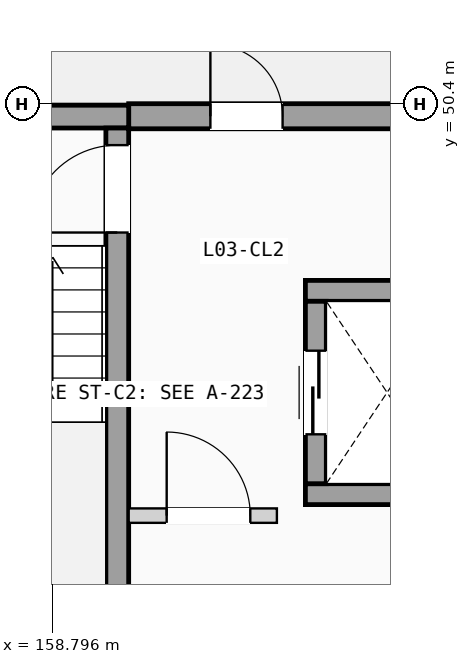
"""IFC4 building model, lengths in metres.
Left out: names, types, materials, properties, quantities, classifications, styles, units other than length and angle.
Written with IfcOpenShell. Run it as: python <this file> out.ifc"""

import sys

from ifc_helpers import new_model, si_unit, direction, frame, frame_2d, origin, place, context, subcontext, project, spatial, rectangle, extrude, element, fill, save


model = new_model("IFC4")
c1 = context("Model", 3, precision=1e-05, world=origin(), true_north=direction((0.0, 1.0)))
c2 = subcontext(c1, "Body", "Model", "MODEL_VIEW")
j1 = project(units=[si_unit("LENGTHUNIT", "METRE"), si_unit("PLANEANGLEUNIT", "RADIAN")], contexts=[c1])
p1 = place(None, origin())
s1 = spatial("IfcSite", under=j1, at=p1, CompositionType="ELEMENT")
p2 = place(p1, origin())
s2 = spatial("IfcBuilding", under=s1, at=p2, CompositionType="ELEMENT")
p3 = place(p2, frame((0.0, 0.0, 12.075)))
s3 = spatial("IfcBuildingStorey", under=s2, at=p3, CompositionType="ELEMENT", Elevation=12.075)
p4 = place(p3, frame((159.8, 50.235, 0.0), z_axis=(0.0, 0.0, 1.0), x_axis=(1.0, 0.0, 0.0)))
e1 = element("IfcWall", 1, at=p4, inside=s3, PredefinedType="SOLIDWALL", context=c2, shape_type="SweptSolid", body=[
    extrude(rectangle(XDim=4.1, YDim=0.33, at=frame_2d((2.05, 0.0))), origin(), (0.0, 0.0, 1.0), 2.89),
])
p5 = place(p4, frame((1.075, 0.0, 0.0)))
e2 = element("IfcOpeningElement", 2, at=p5, cuts=e1, PredefinedType="OPENING", context=c2, shape_type="SweptSolid", body=[
    extrude(rectangle(XDim=0.95, YDim=2.15, at=frame_2d((0.475, 1.075))), frame((0.0, 0.175, 0.0), z_axis=(0.0, -1.0, 0.0), x_axis=(1.0, 0.0, 0.0)), (0.0, 0.0, 1.0), 0.35),
])
p6 = place(p3, frame((156.2, 50.23, 0.0), z_axis=(0.0, 0.0, 1.0), x_axis=(1.0, 0.0, 0.0)))
e3 = element("IfcWall", 3, at=p6, inside=s3, PredefinedType="SHEAR", context=c2, shape_type="SweptSolid", body=[
    extrude(rectangle(XDim=3.6, YDim=0.3, at=frame_2d((1.8, 0.0))), origin(), (0.0, 0.0, 1.0), 2.89),
])
p7 = place(p3, frame((159.65, 43.08, 0.0), z_axis=(0.0, 0.0, 1.0), x_axis=(0.0, 1.0, 0.0)))
e4 = element("IfcWall", 4, at=p7, inside=s3, PredefinedType="SHEAR", context=c2, shape_type="SweptSolid", body=[
    extrude(rectangle(XDim=7.0, YDim=0.3, at=frame_2d((3.5, 0.0))), origin(), (0.0, 0.0, 1.0), 2.89),
])
p8 = place(p7, frame((5.625, 0.0, 0.0)))
e5 = element("IfcOpeningElement", 5, at=p8, cuts=e4, PredefinedType="OPENING", context=c2, shape_type="SweptSolid", body=[
    extrude(rectangle(XDim=1.15, YDim=2.12, at=frame_2d((0.575, 1.06))), frame((0.0, 0.16, 0.0), z_axis=(0.0, -1.0, 0.0), x_axis=(1.0, 0.0, 0.0)), (0.0, 0.0, 1.0), 0.32),
])
for number, where, z_axis, x_axis in (
    (6, (162.125, 45.262, 0.0), (0.0, 0.0, 1.0), (1.0, 0.0, 0.0)),
    (7, (162.125, 47.938, 0.0), (0.0, 0.0, 1.0), (1.0, 0.0, 0.0)),
):
    element("IfcWall", number, at=place(p3, frame(where, z_axis=z_axis, x_axis=x_axis)), inside=s3, PredefinedType="SHEAR", context=c2, shape_type="SweptSolid", body=[
        extrude(rectangle(XDim=2.15, YDim=0.275, at=frame_2d((1.075, 0.0))), origin(), (0.0, 0.0, 1.0), 2.89),
    ])
p9 = place(p3, frame((162.262, 45.4, 0.0), z_axis=(0.0, 0.0, 1.0), x_axis=(0.0, 1.0, 0.0)))
e8 = element("IfcWall", 8, at=p9, inside=s3, PredefinedType="SHEAR", context=c2, shape_type="SweptSolid", body=[
    extrude(rectangle(XDim=2.4, YDim=0.275, at=frame_2d((1.2, 0.0))), origin(), (0.0, 0.0, 1.0), 2.89),
])
p10 = place(p9, frame((0.65, 0.0, 0.0)))
e9 = element("IfcOpeningElement", 9, at=p10, cuts=e8, PredefinedType="OPENING", context=c2, shape_type="SweptSolid", body=[
    extrude(rectangle(XDim=1.1, YDim=2.15, at=frame_2d((0.55, 1.075))), frame((0.0, 0.147, 0.0), z_axis=(0.0, -1.0, 0.0), x_axis=(1.0, 0.0, 0.0)), (0.0, 0.0, 1.0), 0.295),
])
p11 = place(p3, frame((159.8, 44.98, 0.0), z_axis=(0.0, 0.0, 1.0), x_axis=(1.0, 0.0, 0.0)))
e10 = element("IfcWall", 10, at=p11, inside=s3, PredefinedType="PARTITIONING", context=c2, shape_type="SweptSolid", body=[
    extrude(rectangle(XDim=1.95, YDim=0.19, at=frame_2d((0.975, 0.0))), origin(), (0.0, 0.0, 1.0), 2.87),
])
p12 = place(p11, frame((0.5, 0.0, 0.0)))
e11 = element("IfcOpeningElement", 11, at=p12, cuts=e10, PredefinedType="OPENING", context=c2, shape_type="SweptSolid", body=[
    extrude(rectangle(XDim=1.1, YDim=2.12, at=frame_2d((0.55, 1.06))), frame((0.0, 0.105, 0.0), z_axis=(0.0, -1.0, 0.0), x_axis=(1.0, 0.0, 0.0)), (0.0, 0.0, 1.0), 0.21),
])
p13 = place(p5, origin())
e12 = element("IfcDoor", 12, at=p13, inside=s3, OperationType="SINGLE_SWING_LEFT", PredefinedType="DOOR", context=c2, shape_type="SweptSolid", body=[
    extrude(rectangle(XDim=0.95, YDim=2.15, at=frame_2d((0.475, 1.075))), frame((0.0, 0.025, 0.0), z_axis=(0.0, -1.0, 0.0), x_axis=(1.0, 0.0, 0.0)), (0.0, 0.0, 1.0), 0.05),
])
fill(e2, e12)
p14 = place(p8, origin())
e13 = element("IfcDoor", 13, at=p14, inside=s3, OperationType="SINGLE_SWING_LEFT", PredefinedType="DOOR", context=c2, shape_type="SweptSolid", body=[
    extrude(rectangle(XDim=1.15, YDim=2.12, at=frame_2d((0.575, 1.06))), frame((0.0, 0.025, 0.0), z_axis=(0.0, -1.0, 0.0), x_axis=(1.0, 0.0, 0.0)), (0.0, 0.0, 1.0), 0.05),
])
fill(e5, e13)
p15 = place(p10, origin())
e14 = element("IfcDoor", 14, at=p15, inside=s3, OperationType="SLIDING_TO_LEFT", PredefinedType="DOOR", context=c2, shape_type="SweptSolid", body=[
    extrude(rectangle(XDim=1.1, YDim=2.15, at=frame_2d((0.55, 1.075))), frame((0.0, 0.025, 0.0), z_axis=(0.0, -1.0, 0.0), x_axis=(1.0, 0.0, 0.0)), (0.0, 0.0, 1.0), 0.05),
])
fill(e9, e14)
p16 = place(p12, origin())
e15 = element("IfcDoor", 15, at=p16, inside=s3, OperationType="SINGLE_SWING_LEFT", PredefinedType="DOOR", context=c2, shape_type="SweptSolid", body=[
    extrude(rectangle(XDim=1.1, YDim=2.12, at=frame_2d((0.55, 1.06))), frame((0.0, 0.025, 0.0), z_axis=(0.0, -1.0, 0.0), x_axis=(1.0, 0.0, 0.0)), (0.0, 0.0, 1.0), 0.05),
])
fill(e11, e15)
save(model, sys.argv[1])
